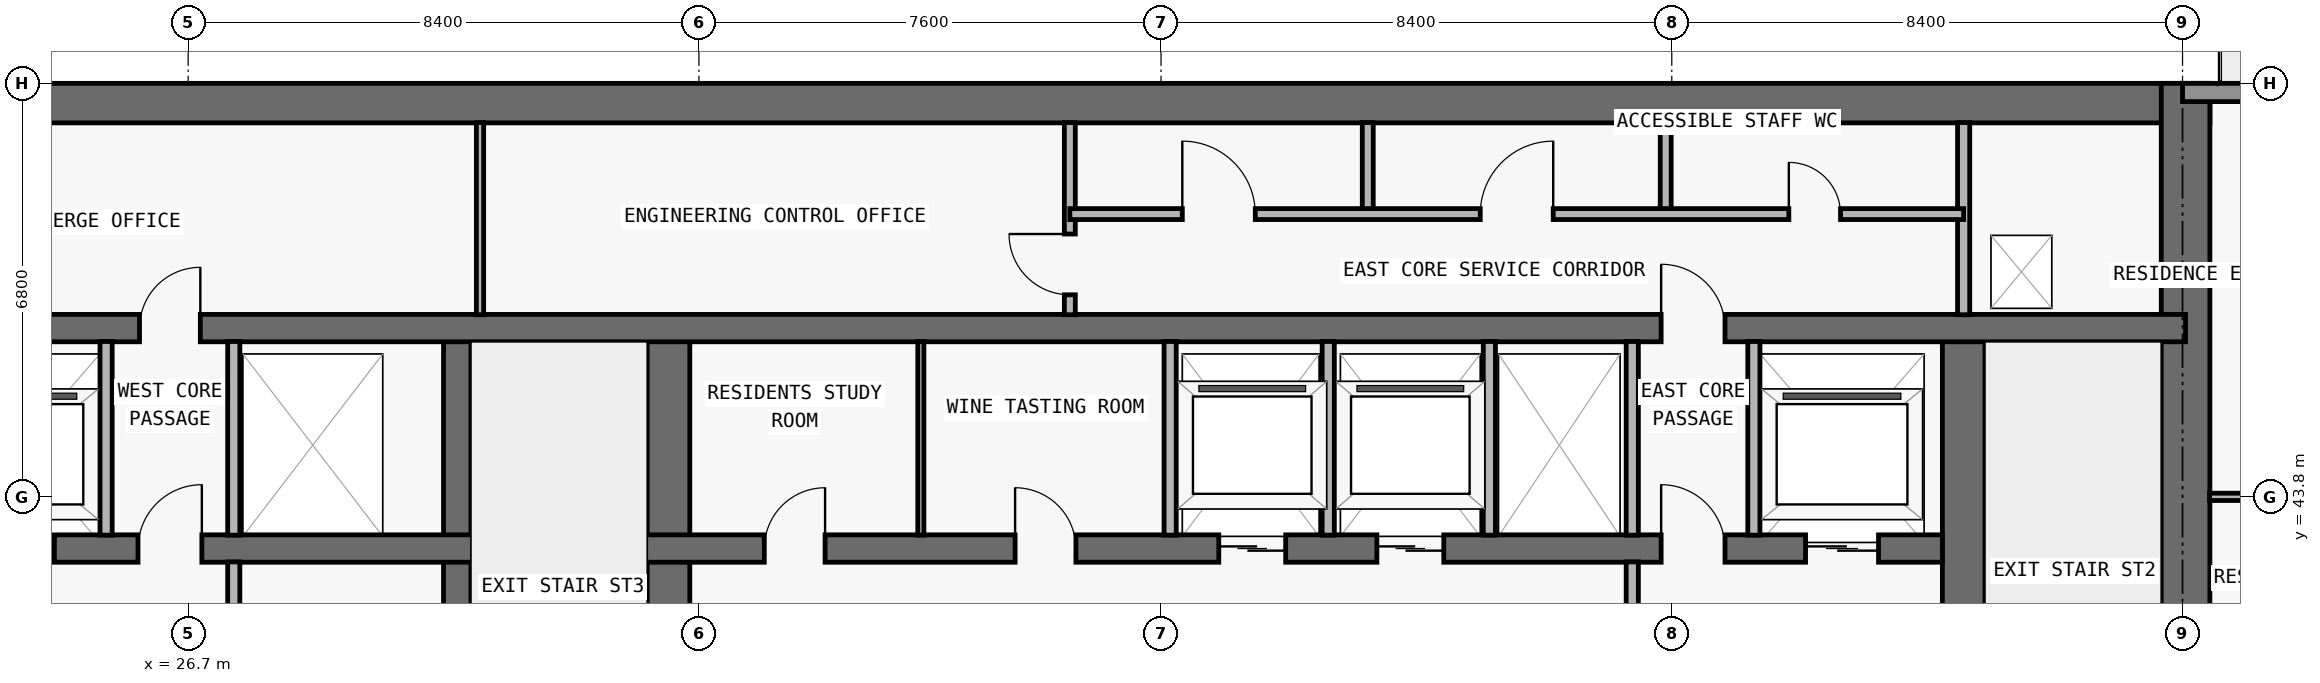
"""IFC4 building model, lengths in metres.
Left out: names, types, materials, properties, quantities, classifications, styles, units other than length and angle.
Written with IfcOpenShell. Run it as: python <this file> out.ifc"""

import sys

from ifc_helpers import new_model, si_unit, direction, frame, frame_2d, origin, place, context, subcontext, project, spatial, rectangle, extrude, element, fill, save


model = new_model("IFC4")
c1 = context("Model", 3, precision=1e-05, world=origin(), true_north=direction((0.0, 1.0)))
c2 = subcontext(c1, "Body", "Model", "MODEL_VIEW")
j1 = project(units=[si_unit("LENGTHUNIT", "METRE"), si_unit("PLANEANGLEUNIT", "RADIAN")], contexts=[c1])
p1 = place(None, origin())
s1 = spatial("IfcSite", under=j1, at=p1, CompositionType="ELEMENT")
p2 = place(p1, origin())
s2 = spatial("IfcBuilding", under=s1, at=p2, CompositionType="ELEMENT")
p3 = place(p2, frame((0.0, 0.0, 122.4)))
s3 = spatial("IfcBuildingStorey", under=s2, at=p3, CompositionType="ELEMENT", Elevation=122.4)
p4 = place(p3, frame((17.85, 50.275, 0.0), z_axis=(0.0, 0.0, 1.0), x_axis=(1.0, 0.0, 0.0)))
e1 = element("IfcWall", 1, at=p4, inside=s3, PredefinedType="SHEAR", context=c2, shape_type="SweptSolid", body=[
    extrude(rectangle(XDim=42.1, YDim=0.65, at=frame_2d((21.05, 0.0))), origin(), (0.0, 0.0, 1.0), 3.05),
])
p5 = place(p3, frame((59.55, 36.55, 0.0), z_axis=(0.0, 0.0, 1.0), x_axis=(0.0, 1.0, 0.0)))
e2 = element("IfcWall", 2, at=p5, inside=s3, PredefinedType="SHEAR", context=c2, shape_type="SweptSolid", body=[
    extrude(rectangle(XDim=14.05, YDim=0.8, at=frame_2d((7.025, 0.0))), origin(), (0.0, 0.0, 1.0), 3.05),
])
p6 = place(p3, frame((55.9, 36.95, 0.0), z_axis=(0.0, 0.0, 1.0), x_axis=(0.0, 1.0, 0.0)))
e3 = element("IfcWall", 3, at=p6, inside=s3, PredefinedType="SHEAR", context=c2, shape_type="SweptSolid", body=[
    extrude(rectangle(XDim=9.625, YDim=0.7, at=frame_2d((4.812, 0.0))), origin(), (0.0, 0.0, 1.0), 3.05),
])
p7 = place(p6, frame((0.6, 0.0, 0.0)))
e4 = element("IfcOpeningElement", 4, at=p7, cuts=e3, PredefinedType="OPENING", context=c2, shape_type="SweptSolid", body=[
    extrude(rectangle(XDim=1.1, YDim=2.15, at=frame_2d((0.55, 1.075))), frame((0.0, 0.36, 0.0), z_axis=(0.0, -1.0, 0.0), x_axis=(1.0, 0.0, 0.0)), (0.0, 0.0, 1.0), 0.72),
])
p8 = place(p3, frame((31.125, 36.95, 0.0), z_axis=(0.0, 0.0, 1.0), x_axis=(0.0, 1.0, 0.0)))
e5 = element("IfcWall", 5, at=p8, inside=s3, PredefinedType="SHEAR", context=c2, shape_type="SweptSolid", body=[
    extrude(rectangle(XDim=9.625, YDim=0.45, at=frame_2d((4.812, 0.0))), origin(), (0.0, 0.0, 1.0), 3.05),
])
p9 = place(p3, frame((34.6, 36.95, 0.0), z_axis=(0.0, 0.0, 1.0), x_axis=(0.0, 1.0, 0.0)))
e6 = element("IfcWall", 6, at=p9, inside=s3, PredefinedType="SHEAR", context=c2, shape_type="SweptSolid", body=[
    extrude(rectangle(XDim=9.625, YDim=0.7, at=frame_2d((4.812, 0.0))), origin(), (0.0, 0.0, 1.0), 3.05),
])
p10 = place(p3, frame((22.25, 42.95, 0.0), z_axis=(0.0, 0.0, 1.0), x_axis=(1.0, 0.0, 0.0)))
e7 = element("IfcWall", 7, at=p10, inside=s3, PredefinedType="SHEAR", context=c2, shape_type="SweptSolid", body=[
    extrude(rectangle(XDim=33.3, YDim=0.45, at=frame_2d((16.65, 0.0))), origin(), (0.0, 0.0, 1.0), 3.05),
])
p11 = place(p10, frame((1.05, 0.0, 0.0)))
e8 = element("IfcOpeningElement", 8, at=p11, cuts=e7, PredefinedType="OPENING", context=c2, shape_type="SweptSolid", body=[
    extrude(rectangle(XDim=1.2, YDim=2.2, at=frame_2d((0.6, 1.1))), frame((0.0, 0.235, 0.0), z_axis=(0.0, -1.0, 0.0), x_axis=(1.0, 0.0, 0.0)), (0.0, 0.0, 1.0), 0.47),
])
p12 = place(p10, frame((31.05, 0.0, 0.0)))
e9 = element("IfcOpeningElement", 9, at=p12, cuts=e7, PredefinedType="OPENING", context=c2, shape_type="SweptSolid", body=[
    extrude(rectangle(XDim=1.2, YDim=2.2, at=frame_2d((0.6, 1.1))), frame((0.0, 0.235, 0.0), z_axis=(0.0, -1.0, 0.0), x_axis=(1.0, 0.0, 0.0)), (0.0, 0.0, 1.0), 0.47),
])
p13 = place(p10, frame((21.4, 0.0, 0.0)))
e10 = element("IfcOpeningElement", 10, at=p13, cuts=e7, PredefinedType="OPENING", context=c2, shape_type="SweptSolid", body=[
    extrude(rectangle(XDim=1.1, YDim=2.2, at=frame_2d((0.55, 1.1))), frame((0.0, 0.235, 0.0), z_axis=(0.0, -1.0, 0.0), x_axis=(1.0, 0.0, 0.0)), (0.0, 0.0, 1.0), 0.47),
])
p14 = place(p10, frame((24.0, 0.0, 0.0)))
e11 = element("IfcOpeningElement", 11, at=p14, cuts=e7, PredefinedType="OPENING", context=c2, shape_type="SweptSolid", body=[
    extrude(rectangle(XDim=1.1, YDim=2.2, at=frame_2d((0.55, 1.1))), frame((0.0, 0.235, 0.0), z_axis=(0.0, -1.0, 0.0), x_axis=(1.0, 0.0, 0.0)), (0.0, 0.0, 1.0), 0.47),
])
p15 = place(p10, frame((3.625, 0.0, 0.0)))
e12 = element("IfcOpeningElement", 12, at=p15, cuts=e7, PredefinedType="OPENING", context=c2, shape_type="SweptSolid", body=[
    extrude(rectangle(XDim=1.05, YDim=2.15, at=frame_2d((0.525, 1.075))), frame((0.0, 0.235, 0.0), z_axis=(0.0, -1.0, 0.0), x_axis=(1.0, 0.0, 0.0)), (0.0, 0.0, 1.0), 0.47),
])
p16 = place(p10, frame((28.675, 0.0, 0.0)))
e13 = element("IfcOpeningElement", 13, at=p16, cuts=e7, PredefinedType="OPENING", context=c2, shape_type="SweptSolid", body=[
    extrude(rectangle(XDim=1.05, YDim=2.15, at=frame_2d((0.525, 1.075))), frame((0.0, 0.235, 0.0), z_axis=(0.0, -1.0, 0.0), x_axis=(1.0, 0.0, 0.0)), (0.0, 0.0, 1.0), 0.47),
])
p17 = place(p10, frame((13.925, 0.0, 0.0)))
e14 = element("IfcOpeningElement", 14, at=p17, cuts=e7, PredefinedType="OPENING", context=c2, shape_type="SweptSolid", body=[
    extrude(rectangle(XDim=1.0, YDim=2.2, at=frame_2d((0.5, 1.1))), frame((0.0, 0.235, 0.0), z_axis=(0.0, -1.0, 0.0), x_axis=(1.0, 0.0, 0.0)), (0.0, 0.0, 1.0), 0.47),
])
p18 = place(p10, frame((18.05, 0.0, 0.0)))
e15 = element("IfcOpeningElement", 15, at=p18, cuts=e7, PredefinedType="OPENING", context=c2, shape_type="SweptSolid", body=[
    extrude(rectangle(XDim=1.0, YDim=2.2, at=frame_2d((0.5, 1.1))), frame((0.0, 0.235, 0.0), z_axis=(0.0, -1.0, 0.0), x_axis=(1.0, 0.0, 0.0)), (0.0, 0.0, 1.0), 0.47),
])
p19 = place(p3, frame((18.25, 46.575, 0.0), z_axis=(0.0, 0.0, 1.0), x_axis=(1.0, 0.0, 0.0)))
e16 = element("IfcWall", 16, at=p19, inside=s3, PredefinedType="SHEAR", context=c2, shape_type="SweptSolid", body=[
    extrude(rectangle(XDim=41.3, YDim=0.45, at=frame_2d((20.65, 0.0))), origin(), (0.0, 0.0, 1.0), 3.05),
])
p20 = place(p19, frame((7.65, 0.0, 0.0)))
e17 = element("IfcOpeningElement", 17, at=p20, cuts=e16, PredefinedType="OPENING", context=c2, shape_type="SweptSolid", body=[
    extrude(rectangle(XDim=1.0, YDim=2.2, at=frame_2d((0.5, 1.1))), frame((0.0, 0.235, 0.0), z_axis=(0.0, -1.0, 0.0), x_axis=(1.0, 0.0, 0.0)), (0.0, 0.0, 1.0), 0.47),
])
p21 = place(p19, frame((32.675, 0.0, 0.0)))
e18 = element("IfcOpeningElement", 18, at=p21, cuts=e16, PredefinedType="OPENING", context=c2, shape_type="SweptSolid", body=[
    extrude(rectangle(XDim=1.05, YDim=2.15, at=frame_2d((0.525, 1.075))), frame((0.0, 0.235, 0.0), z_axis=(0.0, -1.0, 0.0), x_axis=(1.0, 0.0, 0.0)), (0.0, 0.0, 1.0), 0.47),
])
p22 = place(p3, frame((59.5, 50.45, 0.0), z_axis=(0.0, 0.0, 1.0), x_axis=(1.0, 0.0, 0.0)))
e19 = element("IfcWall", 19, at=p22, inside=s3, PredefinedType="STANDARD", context=c2, shape_type="SweptSolid", body=[
    extrude(rectangle(XDim=10.6, YDim=0.3, at=frame_2d((5.3, 0.0))), origin(), (0.0, 0.0, 1.0), 3.05),
])
p23 = place(p22, frame((4.3, 0.0, 0.0)))
e20 = element("IfcOpeningElement", 20, at=p23, cuts=e19, PredefinedType="OPENING", context=c2, shape_type="SweptSolid", body=[
    extrude(rectangle(XDim=2.0, YDim=2.3, at=frame_2d((1.0, 1.15))), frame((0.0, 0.16, 0.0), z_axis=(0.0, -1.0, 0.0), x_axis=(1.0, 0.0, 0.0)), (0.0, 0.0, 1.0), 0.32),
])
p24 = place(p3, frame((25.35, 43.17, 0.0), z_axis=(0.0, 0.0, 1.0), x_axis=(0.0, 1.0, 0.0)))
e21 = element("IfcWall", 21, at=p24, inside=s3, PredefinedType="PARTITIONING", context=c2, shape_type="SweptSolid", body=[
    extrude(rectangle(XDim=3.185, YDim=0.2, at=frame_2d((1.593, 0.0))), origin(), (0.0, 0.0, 1.0), 3.05),
])
p25 = place(p3, frame((27.45, 37.345, 0.0), z_axis=(0.0, 0.0, 1.0), x_axis=(0.0, 1.0, 0.0)))
e22 = element("IfcWall", 22, at=p25, inside=s3, PredefinedType="PARTITIONING", context=c2, shape_type="SweptSolid", body=[
    extrude(rectangle(XDim=5.385, YDim=0.2, at=frame_2d((2.692, 0.0))), origin(), (0.0, 0.0, 1.0), 3.05),
])
p26 = place(p3, frame((27.45, 43.17, 0.0), z_axis=(0.0, 0.0, 1.0), x_axis=(0.0, 1.0, 0.0)))
e23 = element("IfcWall", 23, at=p26, inside=s3, PredefinedType="PARTITIONING", context=c2, shape_type="SweptSolid", body=[
    extrude(rectangle(XDim=3.185, YDim=0.2, at=frame_2d((1.593, 0.0))), origin(), (0.0, 0.0, 1.0), 3.05),
])
p27 = place(p3, frame((31.5, 46.795, 0.0), z_axis=(0.0, 0.0, 1.0), x_axis=(0.0, 1.0, 0.0)))
e24 = element("IfcWall", 24, at=p27, inside=s3, PredefinedType="PARTITIONING", context=c2, shape_type="SweptSolid", body=[
    extrude(rectangle(XDim=3.16, YDim=0.12, at=frame_2d((1.58, 0.0))), origin(), (0.0, 0.0, 1.0), 3.05),
])
p28 = place(p3, frame((38.75, 43.17, 0.0), z_axis=(0.0, 0.0, 1.0), x_axis=(0.0, 1.0, 0.0)))
e25 = element("IfcWall", 25, at=p28, inside=s3, PredefinedType="MOVABLE", context=c2, shape_type="SweptSolid", body=[
    extrude(rectangle(XDim=3.185, YDim=0.1, at=frame_2d((1.593, 0.0))), origin(), (0.0, 0.0, 1.0), 3.05),
])
p29 = place(p3, frame((41.2, 46.795, 0.0), z_axis=(0.0, 0.0, 1.0), x_axis=(0.0, 1.0, 0.0)))
e26 = element("IfcWall", 26, at=p29, inside=s3, PredefinedType="PARTITIONING", context=c2, shape_type="SweptSolid", body=[
    extrude(rectangle(XDim=3.16, YDim=0.18, at=frame_2d((1.58, 0.0))), origin(), (0.0, 0.0, 1.0), 3.05),
])
p30 = place(p29, frame((0.327, 0.0, 0.0)))
e27 = element("IfcOpeningElement", 27, at=p30, cuts=e26, PredefinedType="OPENING", context=c2, shape_type="SweptSolid", body=[
    extrude(rectangle(XDim=1.0, YDim=2.2, at=frame_2d((0.5, 1.1))), frame((0.0, 0.1, 0.0), z_axis=(0.0, -1.0, 0.0), x_axis=(1.0, 0.0, 0.0)), (0.0, 0.0, 1.0), 0.2),
])
for number, where, z_axis, x_axis in (
    (28, (42.85, 43.17, 0.0), (0.0, 0.0, 1.0), (0.0, 1.0, 0.0)),
    (29, (45.45, 43.17, 0.0), (0.0, 0.0, 1.0), (0.0, 1.0, 0.0)),
):
    element("IfcWall", number, at=place(p3, frame(where, z_axis=z_axis, x_axis=x_axis)), inside=s3, PredefinedType="PARTITIONING", context=c2, shape_type="SweptSolid", body=[
        extrude(rectangle(XDim=3.185, YDim=0.2, at=frame_2d((1.593, 0.0))), origin(), (0.0, 0.0, 1.0), 3.05),
    ])
p31 = place(p3, frame((46.1, 48.45, 0.0), z_axis=(0.0, 0.0, 1.0), x_axis=(0.0, 1.0, 0.0)))
e30 = element("IfcWall", 30, at=p31, inside=s3, PredefinedType="PARTITIONING", context=c2, shape_type="SweptSolid", body=[
    extrude(rectangle(XDim=1.505, YDim=0.18, at=frame_2d((0.752, 0.0))), origin(), (0.0, 0.0, 1.0), 3.05),
])
p32 = place(p3, frame((48.1, 43.17, 0.0), z_axis=(0.0, 0.0, 1.0), x_axis=(0.0, 1.0, 0.0)))
e31 = element("IfcWall", 31, at=p32, inside=s3, PredefinedType="PARTITIONING", context=c2, shape_type="SweptSolid", body=[
    extrude(rectangle(XDim=3.185, YDim=0.2, at=frame_2d((1.593, 0.0))), origin(), (0.0, 0.0, 1.0), 3.05),
])
p33 = place(p3, frame((50.45, 37.345, 0.0), z_axis=(0.0, 0.0, 1.0), x_axis=(0.0, 1.0, 0.0)))
e32 = element("IfcWall", 32, at=p33, inside=s3, PredefinedType="PARTITIONING", context=c2, shape_type="SweptSolid", body=[
    extrude(rectangle(XDim=5.385, YDim=0.2, at=frame_2d((2.692, 0.0))), origin(), (0.0, 0.0, 1.0), 3.05),
])
p34 = place(p3, frame((50.45, 43.17, 0.0), z_axis=(0.0, 0.0, 1.0), x_axis=(0.0, 1.0, 0.0)))
e33 = element("IfcWall", 33, at=p34, inside=s3, PredefinedType="PARTITIONING", context=c2, shape_type="SweptSolid", body=[
    extrude(rectangle(XDim=3.185, YDim=0.2, at=frame_2d((1.593, 0.0))), origin(), (0.0, 0.0, 1.0), 3.05),
])
p35 = place(p3, frame((51.0, 48.45, 0.0), z_axis=(0.0, 0.0, 1.0), x_axis=(0.0, 1.0, 0.0)))
e34 = element("IfcWall", 34, at=p35, inside=s3, PredefinedType="PARTITIONING", context=c2, shape_type="SweptSolid", body=[
    extrude(rectangle(XDim=1.505, YDim=0.18, at=frame_2d((0.752, 0.0))), origin(), (0.0, 0.0, 1.0), 3.05),
])
p36 = place(p3, frame((52.45, 43.17, 0.0), z_axis=(0.0, 0.0, 1.0), x_axis=(0.0, 1.0, 0.0)))
e35 = element("IfcWall", 35, at=p36, inside=s3, PredefinedType="PARTITIONING", context=c2, shape_type="SweptSolid", body=[
    extrude(rectangle(XDim=3.185, YDim=0.2, at=frame_2d((1.593, 0.0))), origin(), (0.0, 0.0, 1.0), 3.05),
])
p37 = place(p3, frame((55.9, 46.795, 0.0), z_axis=(0.0, 0.0, 1.0), x_axis=(0.0, 1.0, 0.0)))
e36 = element("IfcWall", 36, at=p37, inside=s3, PredefinedType="PARTITIONING", context=c2, shape_type="SweptSolid", body=[
    extrude(rectangle(XDim=3.16, YDim=0.2, at=frame_2d((1.58, 0.0))), origin(), (0.0, 0.0, 1.0), 3.05),
])
p38 = place(p3, frame((59.945, 43.8, 0.0), z_axis=(0.0, 0.0, 1.0), x_axis=(1.0, 0.0, 0.0)))
e37 = element("IfcWall", 37, at=p38, inside=s3, PredefinedType="PARTITIONING", context=c2, shape_type="SweptSolid", body=[
    extrude(rectangle(XDim=13.66, YDim=0.12, at=frame_2d((6.83, 0.0))), origin(), (0.0, 0.0, 1.0), 2.339),
])
p39 = place(p38, frame((4.017, 0.0, 0.0)))
e38 = element("IfcOpeningElement", 38, at=p39, cuts=e37, PredefinedType="OPENING", context=c2, shape_type="SweptSolid", body=[
    extrude(rectangle(XDim=0.9, YDim=2.15, at=frame_2d((0.45, 1.075))), frame((0.0, 0.07, 0.0), z_axis=(0.0, -1.0, 0.0), x_axis=(1.0, 0.0, 0.0)), (0.0, 0.0, 1.0), 0.14),
])
p40 = place(p38, frame((0.702, 0.0, 0.0)))
e39 = element("IfcOpeningElement", 39, at=p40, cuts=e37, PredefinedType="OPENING", context=c2, shape_type="SweptSolid", body=[
    extrude(rectangle(XDim=0.85, YDim=2.1, at=frame_2d((0.425, 1.05))), frame((0.0, 0.07, 0.0), z_axis=(0.0, -1.0, 0.0), x_axis=(1.0, 0.0, 0.0)), (0.0, 0.0, 1.0), 0.14),
])
p41 = place(p3, frame((41.2, 48.45, 0.0), z_axis=(0.0, 0.0, 1.0), x_axis=(1.0, 0.0, 0.0)))
e40 = element("IfcWall", 40, at=p41, inside=s3, PredefinedType="PARTITIONING", context=c2, shape_type="SweptSolid", body=[
    extrude(rectangle(XDim=14.7, YDim=0.18, at=frame_2d((7.35, 0.0))), origin(), (0.0, 0.0, 1.0), 3.05),
])
p42 = place(p41, frame((1.85, 0.0, 0.0)))
e41 = element("IfcOpeningElement", 41, at=p42, cuts=e40, PredefinedType="OPENING", context=c2, shape_type="SweptSolid", body=[
    extrude(rectangle(XDim=1.2, YDim=2.2, at=frame_2d((0.6, 1.1))), frame((0.0, 0.1, 0.0), z_axis=(0.0, -1.0, 0.0), x_axis=(1.0, 0.0, 0.0)), (0.0, 0.0, 1.0), 0.2),
])
p43 = place(p41, frame((6.75, 0.0, 0.0)))
e42 = element("IfcOpeningElement", 42, at=p43, cuts=e40, PredefinedType="OPENING", context=c2, shape_type="SweptSolid", body=[
    extrude(rectangle(XDim=1.2, YDim=2.2, at=frame_2d((0.6, 1.1))), frame((0.0, 0.1, 0.0), z_axis=(0.0, -1.0, 0.0), x_axis=(1.0, 0.0, 0.0)), (0.0, 0.0, 1.0), 0.2),
])
p44 = place(p41, frame((11.825, 0.0, 0.0)))
e43 = element("IfcOpeningElement", 43, at=p44, cuts=e40, PredefinedType="OPENING", context=c2, shape_type="SweptSolid", body=[
    extrude(rectangle(XDim=0.85, YDim=2.1, at=frame_2d((0.425, 1.05))), frame((0.0, 0.1, 0.0), z_axis=(0.0, -1.0, 0.0), x_axis=(1.0, 0.0, 0.0)), (0.0, 0.0, 1.0), 0.2),
])
p45 = place(p11, origin())
e44 = element("IfcDoor", 44, at=p45, inside=s3, OperationType="DOUBLE_DOOR_SLIDING", PredefinedType="DOOR", context=c2, shape_type="SweptSolid", body=[
    extrude(rectangle(XDim=1.2, YDim=2.2, at=frame_2d((0.6, 1.1))), frame((0.0, 0.025, 0.0), z_axis=(0.0, -1.0, 0.0), x_axis=(1.0, 0.0, 0.0)), (0.0, 0.0, 1.0), 0.05),
])
fill(e8, e44)
p46 = place(p12, origin())
e45 = element("IfcDoor", 45, at=p46, inside=s3, OperationType="DOUBLE_DOOR_SLIDING", PredefinedType="DOOR", context=c2, shape_type="SweptSolid", body=[
    extrude(rectangle(XDim=1.2, YDim=2.2, at=frame_2d((0.6, 1.1))), frame((0.0, 0.025, 0.0), z_axis=(0.0, -1.0, 0.0), x_axis=(1.0, 0.0, 0.0)), (0.0, 0.0, 1.0), 0.05),
])
fill(e9, e45)
p47 = place(p13, origin())
e46 = element("IfcDoor", 46, at=p47, inside=s3, OperationType="DOUBLE_DOOR_SLIDING", PredefinedType="DOOR", context=c2, shape_type="SweptSolid", body=[
    extrude(rectangle(XDim=1.1, YDim=2.2, at=frame_2d((0.55, 1.1))), frame((0.0, 0.025, 0.0), z_axis=(0.0, -1.0, 0.0), x_axis=(1.0, 0.0, 0.0)), (0.0, 0.0, 1.0), 0.05),
])
fill(e10, e46)
p48 = place(p14, origin())
e47 = element("IfcDoor", 47, at=p48, inside=s3, OperationType="DOUBLE_DOOR_SLIDING", PredefinedType="DOOR", context=c2, shape_type="SweptSolid", body=[
    extrude(rectangle(XDim=1.1, YDim=2.2, at=frame_2d((0.55, 1.1))), frame((0.0, 0.025, 0.0), z_axis=(0.0, -1.0, 0.0), x_axis=(1.0, 0.0, 0.0)), (0.0, 0.0, 1.0), 0.05),
])
fill(e11, e47)
p49 = place(p15, origin())
e48 = element("IfcDoor", 48, at=p49, inside=s3, OperationType="SINGLE_SWING_RIGHT", PredefinedType="DOOR", context=c2, shape_type="SweptSolid", body=[
    extrude(rectangle(XDim=1.05, YDim=2.15, at=frame_2d((0.525, 1.075))), frame((0.0, 0.025, 0.0), z_axis=(0.0, -1.0, 0.0), x_axis=(1.0, 0.0, 0.0)), (0.0, 0.0, 1.0), 0.05),
])
fill(e12, e48)
p50 = place(p16, origin())
e49 = element("IfcDoor", 49, at=p50, inside=s3, OperationType="SINGLE_SWING_LEFT", PredefinedType="DOOR", context=c2, shape_type="SweptSolid", body=[
    extrude(rectangle(XDim=1.05, YDim=2.15, at=frame_2d((0.525, 1.075))), frame((0.0, 0.025, 0.0), z_axis=(0.0, -1.0, 0.0), x_axis=(1.0, 0.0, 0.0)), (0.0, 0.0, 1.0), 0.05),
])
fill(e13, e49)
p51 = place(p17, origin())
e50 = element("IfcDoor", 50, at=p51, inside=s3, OperationType="SINGLE_SWING_RIGHT", PredefinedType="DOOR", context=c2, shape_type="SweptSolid", body=[
    extrude(rectangle(XDim=1.0, YDim=2.2, at=frame_2d((0.5, 1.1))), frame((0.0, 0.025, 0.0), z_axis=(0.0, -1.0, 0.0), x_axis=(1.0, 0.0, 0.0)), (0.0, 0.0, 1.0), 0.05),
])
fill(e14, e50)
p52 = place(p18, origin())
e51 = element("IfcDoor", 51, at=p52, inside=s3, OperationType="SINGLE_SWING_LEFT", PredefinedType="DOOR", context=c2, shape_type="SweptSolid", body=[
    extrude(rectangle(XDim=1.0, YDim=2.2, at=frame_2d((0.5, 1.1))), frame((0.0, 0.025, 0.0), z_axis=(0.0, -1.0, 0.0), x_axis=(1.0, 0.0, 0.0)), (0.0, 0.0, 1.0), 0.05),
])
fill(e15, e51)
p53 = place(p20, origin())
e52 = element("IfcDoor", 52, at=p53, inside=s3, OperationType="SINGLE_SWING_RIGHT", PredefinedType="DOOR", context=c2, shape_type="SweptSolid", body=[
    extrude(rectangle(XDim=1.0, YDim=2.2, at=frame_2d((0.5, 1.1))), frame((0.0, 0.025, 0.0), z_axis=(0.0, -1.0, 0.0), x_axis=(1.0, 0.0, 0.0)), (0.0, 0.0, 1.0), 0.05),
])
fill(e17, e52)
p54 = place(p21, origin())
e53 = element("IfcDoor", 53, at=p54, inside=s3, OperationType="SINGLE_SWING_LEFT", PredefinedType="DOOR", context=c2, shape_type="SweptSolid", body=[
    extrude(rectangle(XDim=1.05, YDim=2.15, at=frame_2d((0.525, 1.075))), frame((0.0, 0.025, 0.0), z_axis=(0.0, -1.0, 0.0), x_axis=(1.0, 0.0, 0.0)), (0.0, 0.0, 1.0), 0.05),
])
fill(e18, e53)
p55 = place(p30, origin())
e54 = element("IfcDoor", 54, at=p55, inside=s3, OperationType="SINGLE_SWING_RIGHT", PredefinedType="DOOR", context=c2, shape_type="SweptSolid", body=[
    extrude(rectangle(XDim=1.0, YDim=2.2, at=frame_2d((0.5, 1.1))), frame((0.0, 0.025, 0.0), z_axis=(0.0, -1.0, 0.0), x_axis=(1.0, 0.0, 0.0)), (0.0, 0.0, 1.0), 0.05),
])
fill(e27, e54)
p56 = place(p42, origin())
e55 = element("IfcDoor", 55, at=p56, inside=s3, OperationType="SINGLE_SWING_LEFT", PredefinedType="DOOR", context=c2, shape_type="SweptSolid", body=[
    extrude(rectangle(XDim=1.2, YDim=2.2, at=frame_2d((0.6, 1.1))), frame((0.0, 0.025, 0.0), z_axis=(0.0, -1.0, 0.0), x_axis=(1.0, 0.0, 0.0)), (0.0, 0.0, 1.0), 0.05),
])
fill(e41, e55)
p57 = place(p43, origin())
e56 = element("IfcDoor", 56, at=p57, inside=s3, OperationType="SINGLE_SWING_RIGHT", PredefinedType="DOOR", context=c2, shape_type="SweptSolid", body=[
    extrude(rectangle(XDim=1.2, YDim=2.2, at=frame_2d((0.6, 1.1))), frame((0.0, 0.025, 0.0), z_axis=(0.0, -1.0, 0.0), x_axis=(1.0, 0.0, 0.0)), (0.0, 0.0, 1.0), 0.05),
])
fill(e42, e56)
p58 = place(p44, origin())
e57 = element("IfcDoor", 57, at=p58, inside=s3, OperationType="SINGLE_SWING_LEFT", PredefinedType="DOOR", context=c2, shape_type="SweptSolid", body=[
    extrude(rectangle(XDim=0.85, YDim=2.1, at=frame_2d((0.425, 1.05))), frame((0.0, 0.025, 0.0), z_axis=(0.0, -1.0, 0.0), x_axis=(1.0, 0.0, 0.0)), (0.0, 0.0, 1.0), 0.05),
])
fill(e43, e57)
save(model, sys.argv[1])
